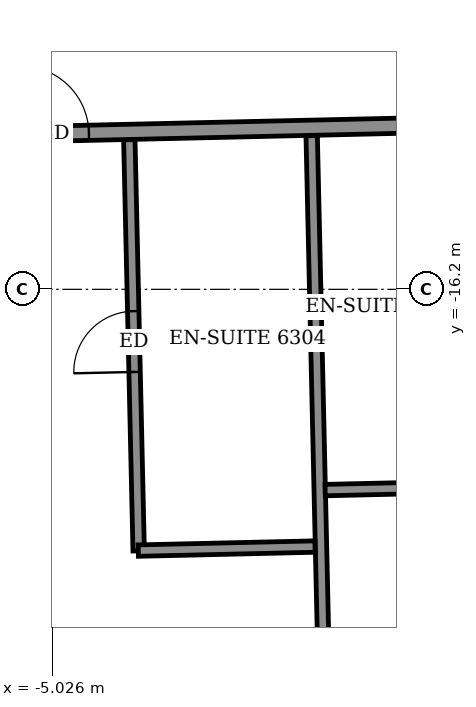
"""IFC4 building model, lengths in metres.
Left out: names, types, materials, properties, quantities, classifications, styles, units other than length and angle.
Written with IfcOpenShell. Run it as: python <this file> out.ifc"""

import sys

from ifc_helpers import new_model, si_unit, direction, frame, frame_2d, origin, place, context, subcontext, project, spatial, rectangle, extrude, element, fill, save


model = new_model("IFC4")
c1 = context("Model", 3, precision=1e-05, world=origin(), true_north=direction((0.0, 1.0)))
c2 = subcontext(c1, "Body", "Model", "MODEL_VIEW")
j1 = project(units=[si_unit("LENGTHUNIT", "METRE"), si_unit("PLANEANGLEUNIT", "RADIAN")], contexts=[c1])
p1 = place(None, origin())
s1 = spatial("IfcSite", under=j1, at=p1, CompositionType="ELEMENT")
p2 = place(p1, origin())
s2 = spatial("IfcBuilding", under=s1, at=p2, CompositionType="ELEMENT")
p3 = place(p2, frame((0.0, 0.0, 249.1)))
s3 = spatial("IfcBuildingStorey", under=s2, at=p3, CompositionType="ELEMENT", Elevation=249.1)
p4 = place(p3, frame((-1.358, -25.551, 0.0), z_axis=(0.0, 0.0, 1.0), x_axis=(-0.022684355347, 0.999742676904, 0.0)))
e1 = element("IfcWall", 1, at=p4, inside=s3, PredefinedType="PARTITIONING", context=c2, shape_type="SweptSolid", body=[
    extrude(rectangle(XDim=11.376, YDim=0.15, at=frame_2d((5.688, 0.0))), origin(), (0.0, 0.0, 1.0), 3.05),
])
p5 = place(p3, frame((-3.892, -19.641, 0.0), z_axis=(0.0, 0.0, 1.0), x_axis=(-0.022696805576, 0.999742394328, 0.0)))
e2 = element("IfcWall", 2, at=p5, inside=s3, PredefinedType="PARTITIONING", context=c2, shape_type="SweptSolid", body=[
    extrude(rectangle(XDim=5.411, YDim=0.15, at=frame_2d((2.705, 0.0))), origin(), (0.0, 0.0, 1.0), 3.05),
])
p6 = place(p5, frame((2.355, 0.0, 0.0)))
e3 = element("IfcOpeningElement", 3, at=p6, cuts=e2, PredefinedType="OPENING", context=c2, shape_type="SweptSolid", body=[
    extrude(rectangle(XDim=0.8, YDim=2.1, at=frame_2d((0.4, 1.05))), frame((0.0, 0.085, 0.0), z_axis=(0.0, -1.0, 0.0), x_axis=(1.0, 0.0, 0.0)), (0.0, 0.0, 1.0), 0.17),
])
p7 = place(p3, frame((-3.897, -19.637, 0.0), z_axis=(0.0, 0.0, 1.0), x_axis=(0.999740478815, 0.022781023197, 0.0)))
e4 = element("IfcWall", 4, at=p7, inside=s3, PredefinedType="PARTITIONING", context=c2, shape_type="SweptSolid", body=[
    extrude(rectangle(XDim=2.325, YDim=0.15, at=frame_2d((1.163, 0.0))), origin(), (0.0, 0.0, 1.0), 3.05),
])
p8 = place(p3, frame((-1.439, -18.841, 0.0), z_axis=(0.0, 0.0, 1.0), x_axis=(0.999740260747, 0.02279059109, 0.0)))
e5 = element("IfcWall", 5, at=p8, inside=s3, PredefinedType="PARTITIONING", context=c2, shape_type="SweptSolid", body=[
    extrude(rectangle(XDim=2.324, YDim=0.15, at=frame_2d((1.162, 0.0))), origin(), (0.0, 0.0, 1.0), 3.05),
])
p9 = place(p3, frame((-27.016, -14.65, 0.0), z_axis=(0.0, 0.0, 1.0), x_axis=(0.999742874861, 0.022675629315, 0.0)))
e6 = element("IfcWall", 6, at=p9, inside=s3, PredefinedType="PARTITIONING", context=c2, shape_type="SweptSolid", body=[
    extrude(rectangle(XDim=50.883, YDim=0.2, at=frame_2d((25.442, 0.0))), origin(), (0.0, 0.0, 1.0), 3.05),
])
p10 = place(p9, frame((1.575, 0.0, 0.0)))
e7 = element("IfcOpeningElement", 7, at=p10, cuts=e6, PredefinedType="OPENING", context=c2, shape_type="SweptSolid", body=[
    extrude(rectangle(XDim=1.0, YDim=2.1, at=frame_2d((0.5, 1.05))), frame((0.0, 0.11, 0.0), z_axis=(0.0, -1.0, 0.0), x_axis=(1.0, 0.0, 0.0)), (0.0, 0.0, 1.0), 0.22),
])
p11 = place(p9, frame((6.4, 0.0, 0.0)))
e8 = element("IfcOpeningElement", 8, at=p11, cuts=e6, PredefinedType="OPENING", context=c2, shape_type="SweptSolid", body=[
    extrude(rectangle(XDim=0.9, YDim=2.1, at=frame_2d((0.45, 1.05))), frame((0.0, 0.11, 0.0), z_axis=(0.0, -1.0, 0.0), x_axis=(1.0, 0.0, 0.0)), (0.0, 0.0, 1.0), 0.22),
])
p12 = place(p9, frame((11.025, 0.0, 0.0)))
e9 = element("IfcOpeningElement", 9, at=p12, cuts=e6, PredefinedType="OPENING", context=c2, shape_type="SweptSolid", body=[
    extrude(rectangle(XDim=0.9, YDim=2.1, at=frame_2d((0.45, 1.05))), frame((0.0, 0.11, 0.0), z_axis=(0.0, -1.0, 0.0), x_axis=(1.0, 0.0, 0.0)), (0.0, 0.0, 1.0), 0.22),
])
p13 = place(p9, frame((12.925, 0.0, 0.0)))
e10 = element("IfcOpeningElement", 10, at=p13, cuts=e6, PredefinedType="OPENING", context=c2, shape_type="SweptSolid", body=[
    extrude(rectangle(XDim=0.9, YDim=2.1, at=frame_2d((0.45, 1.05))), frame((0.0, 0.11, 0.0), z_axis=(0.0, -1.0, 0.0), x_axis=(1.0, 0.0, 0.0)), (0.0, 0.0, 1.0), 0.22),
])
p14 = place(p9, frame((19.65, 0.0, 0.0)))
e11 = element("IfcOpeningElement", 11, at=p14, cuts=e6, PredefinedType="OPENING", context=c2, shape_type="SweptSolid", body=[
    extrude(rectangle(XDim=0.9, YDim=2.1, at=frame_2d((0.45, 1.05))), frame((0.0, 0.11, 0.0), z_axis=(0.0, -1.0, 0.0), x_axis=(1.0, 0.0, 0.0)), (0.0, 0.0, 1.0), 0.22),
])
p15 = place(p9, frame((21.575, 0.0, 0.0)))
e12 = element("IfcOpeningElement", 12, at=p15, cuts=e6, PredefinedType="OPENING", context=c2, shape_type="SweptSolid", body=[
    extrude(rectangle(XDim=0.9, YDim=2.1, at=frame_2d((0.45, 1.05))), frame((0.0, 0.11, 0.0), z_axis=(0.0, -1.0, 0.0), x_axis=(1.0, 0.0, 0.0)), (0.0, 0.0, 1.0), 0.22),
])
p16 = place(p9, frame((28.25, 0.0, 0.0)))
e13 = element("IfcOpeningElement", 13, at=p16, cuts=e6, PredefinedType="OPENING", context=c2, shape_type="SweptSolid", body=[
    extrude(rectangle(XDim=0.9, YDim=2.1, at=frame_2d((0.45, 1.05))), frame((0.0, 0.11, 0.0), z_axis=(0.0, -1.0, 0.0), x_axis=(1.0, 0.0, 0.0)), (0.0, 0.0, 1.0), 0.22),
])
p17 = place(p9, frame((30.125, 0.0, 0.0)))
e14 = element("IfcOpeningElement", 14, at=p17, cuts=e6, PredefinedType="OPENING", context=c2, shape_type="SweptSolid", body=[
    extrude(rectangle(XDim=0.9, YDim=2.1, at=frame_2d((0.45, 1.05))), frame((0.0, 0.11, 0.0), z_axis=(0.0, -1.0, 0.0), x_axis=(1.0, 0.0, 0.0)), (0.0, 0.0, 1.0), 0.22),
])
p18 = place(p9, frame((36.9, 0.0, 0.0)))
e15 = element("IfcOpeningElement", 15, at=p18, cuts=e6, PredefinedType="OPENING", context=c2, shape_type="SweptSolid", body=[
    extrude(rectangle(XDim=0.9, YDim=2.1, at=frame_2d((0.45, 1.05))), frame((0.0, 0.11, 0.0), z_axis=(0.0, -1.0, 0.0), x_axis=(1.0, 0.0, 0.0)), (0.0, 0.0, 1.0), 0.22),
])
p19 = place(p9, frame((38.85, 0.0, 0.0)))
e16 = element("IfcOpeningElement", 16, at=p19, cuts=e6, PredefinedType="OPENING", context=c2, shape_type="SweptSolid", body=[
    extrude(rectangle(XDim=0.9, YDim=2.1, at=frame_2d((0.45, 1.05))), frame((0.0, 0.11, 0.0), z_axis=(0.0, -1.0, 0.0), x_axis=(1.0, 0.0, 0.0)), (0.0, 0.0, 1.0), 0.22),
])
p20 = place(p9, frame((48.629, 0.0, 0.0)))
e17 = element("IfcOpeningElement", 17, at=p20, cuts=e6, PredefinedType="OPENING", context=c2, shape_type="SweptSolid", body=[
    extrude(rectangle(XDim=1.0, YDim=2.1, at=frame_2d((0.5, 1.05))), frame((0.0, 0.11, 0.0), z_axis=(0.0, -1.0, 0.0), x_axis=(1.0, 0.0, 0.0)), (0.0, 0.0, 1.0), 0.22),
])
p21 = place(p9, frame((43.6, 0.0, 0.0)))
e18 = element("IfcOpeningElement", 18, at=p21, cuts=e6, PredefinedType="OPENING", context=c2, shape_type="SweptSolid", body=[
    extrude(rectangle(XDim=0.9, YDim=2.1, at=frame_2d((0.45, 1.05))), frame((0.0, 0.11, 0.0), z_axis=(0.0, -1.0, 0.0), x_axis=(1.0, 0.0, 0.0)), (0.0, 0.0, 1.0), 0.22),
])
p22 = place(p15, origin())
e19 = element("IfcDoor", 19, at=p22, inside=s3, OperationType="SINGLE_SWING_RIGHT", PredefinedType="DOOR", context=c2, shape_type="SweptSolid", body=[
    extrude(rectangle(XDim=0.9, YDim=2.1, at=frame_2d((0.45, 1.05))), frame((0.0, 0.025, 0.0), z_axis=(0.0, -1.0, 0.0), x_axis=(1.0, 0.0, 0.0)), (0.0, 0.0, 1.0), 0.05),
])
fill(e12, e19)
p23 = place(p6, origin())
e20 = element("IfcDoor", 20, at=p23, inside=s3, OperationType="SINGLE_SWING_RIGHT", PredefinedType="DOOR", context=c2, shape_type="SweptSolid", body=[
    extrude(rectangle(XDim=0.8, YDim=2.1, at=frame_2d((0.4, 1.05))), frame((0.0, 0.025, 0.0), z_axis=(0.0, -1.0, 0.0), x_axis=(1.0, 0.0, 0.0)), (0.0, 0.0, 1.0), 0.05),
])
fill(e3, e20)
save(model, sys.argv[1])
